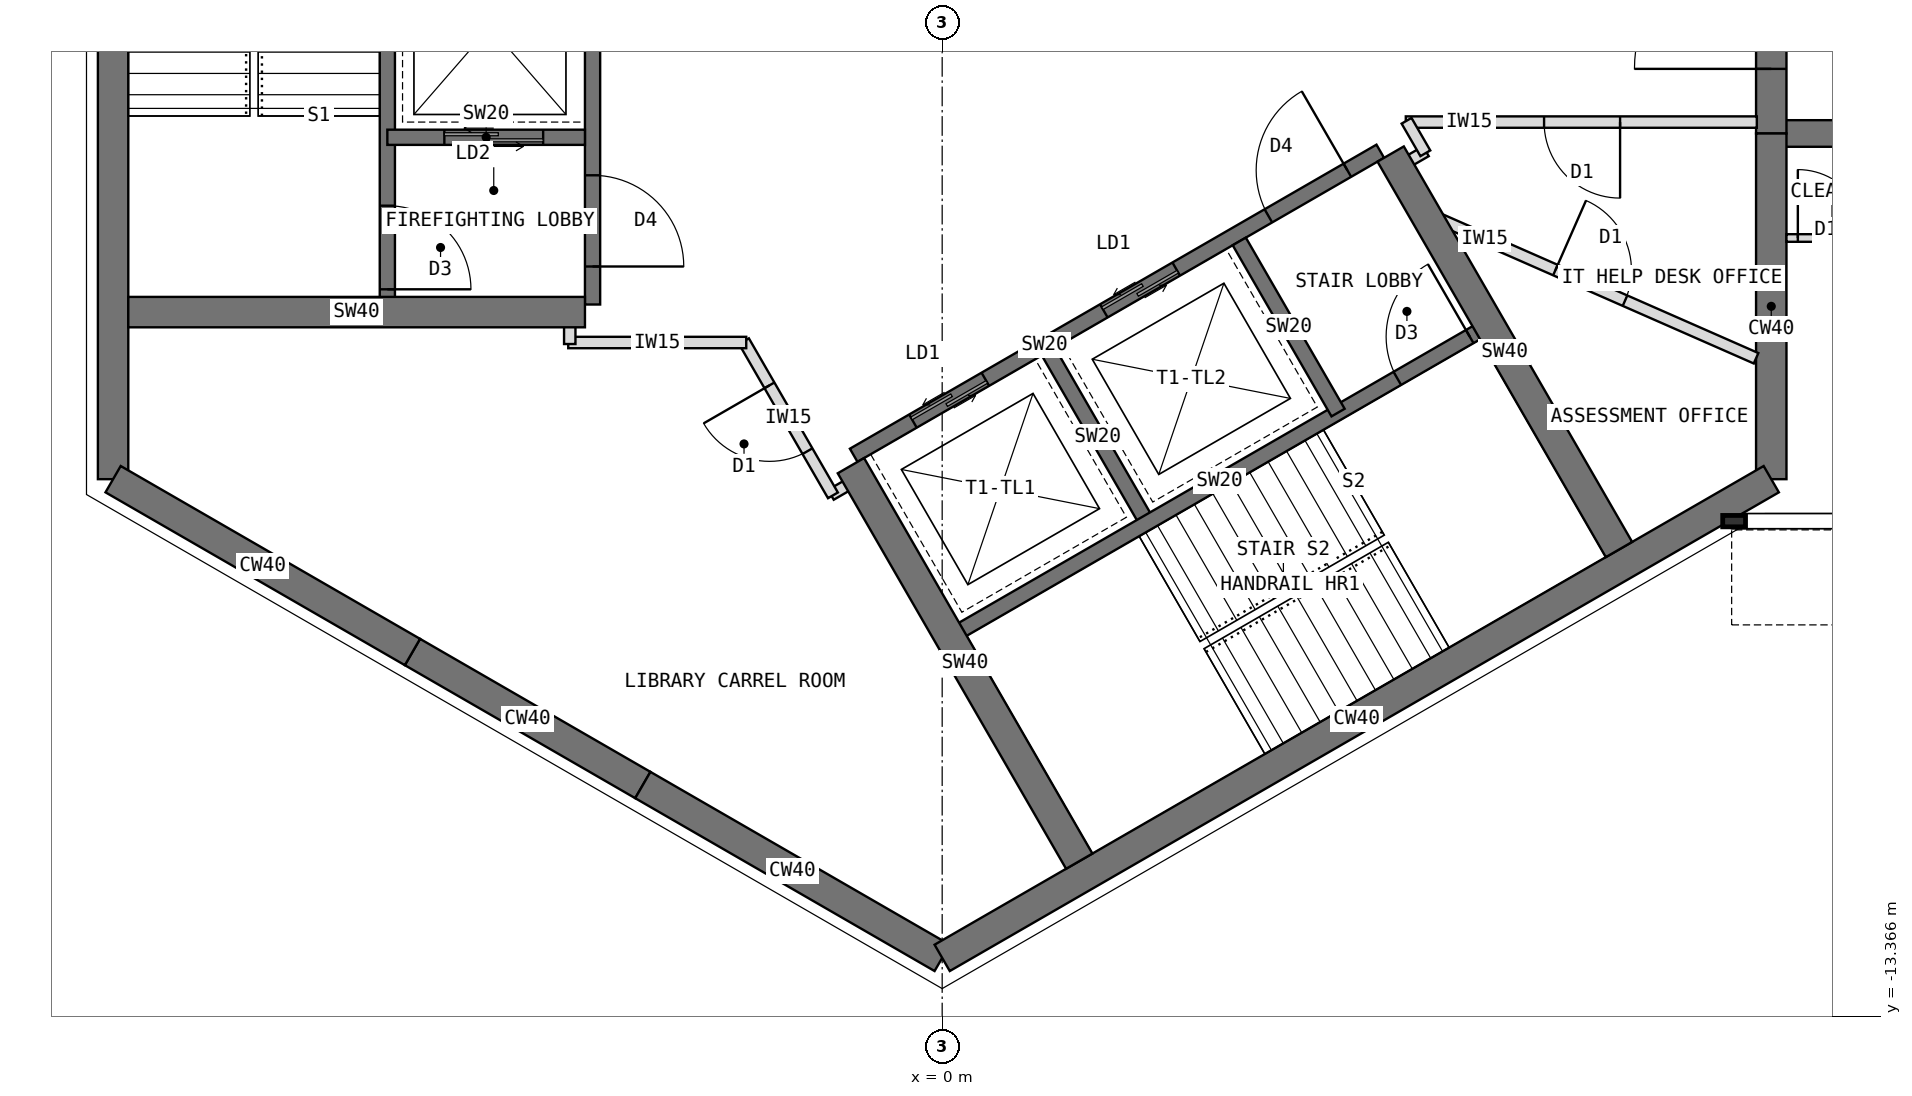
"""IFC4 building model, lengths in metres.
Left out: names, types, materials, properties, quantities, classifications, styles, units other than length and angle.
Written with IfcOpenShell. Run it as: python <this file> out.ifc"""

import sys

from ifc_helpers import new_model, si_unit, direction, frame, frame_2d, origin, place, context, subcontext, project, spatial, rectangle, extrude, element, fill, save


model = new_model("IFC4")
c1 = context("Model", 3, precision=1e-05, world=origin(), true_north=direction((0.0, 1.0)))
c2 = subcontext(c1, "Body", "Model", "MODEL_VIEW")
j1 = project(units=[si_unit("LENGTHUNIT", "METRE"), si_unit("PLANEANGLEUNIT", "RADIAN")], contexts=[c1])
p1 = place(None, origin())
s1 = spatial("IfcSite", under=j1, at=p1, CompositionType="ELEMENT")
p2 = place(p1, origin())
s2 = spatial("IfcBuilding", under=s1, at=p2, CompositionType="ELEMENT")
p3 = place(p2, frame((0.0, 0.0, 267.5)))
s3 = spatial("IfcBuildingStorey", under=s2, at=p3, CompositionType="ELEMENT", Elevation=267.5)
p4 = place(p3, frame((10.908, -6.298, 0.0), z_axis=(0.0, 0.0, 1.0), x_axis=(0.0, 1.0, 0.0)))
e1 = element("IfcWall", 1, at=p4, inside=s3, PredefinedType="SHEAR", context=c2, shape_type="SweptSolid", body=[
    extrude(rectangle(XDim=4.548, YDim=0.4, at=frame_2d((2.274, 0.0))), origin(), (0.0, 0.0, 1.0), 4.0),
])
p5 = place(p3, frame((10.908, -1.75, 0.0), z_axis=(0.0, 0.0, 1.0), x_axis=(0.0, 1.0, 0.0)))
e2 = element("IfcWall", 2, at=p5, inside=s3, PredefinedType="SHEAR", context=c2, shape_type="SweptSolid", body=[
    extrude(rectangle(XDim=3.5, YDim=0.4, at=frame_2d((1.75, 0.0))), origin(), (0.0, 0.0, 1.0), 4.0),
])
p6 = place(p5, frame((0.85, 0.0, 0.0)))
e3 = element("IfcOpeningElement", 3, at=p6, cuts=e2, PredefinedType="OPENING", context=c2, shape_type="SweptSolid", body=[
    extrude(rectangle(XDim=1.8, YDim=2.1, at=frame_2d((0.9, 1.05))), frame((0.0, 0.21, 0.0), z_axis=(0.0, -1.0, 0.0), x_axis=(1.0, 0.0, 0.0)), (0.0, 0.0, 1.0), 0.42),
])
p7 = place(p3, frame((-10.908, 6.298, 0.0), z_axis=(0.0, 0.0, 1.0), x_axis=(0.0, -1.0, 0.0)))
e4 = element("IfcWall", 4, at=p7, inside=s3, PredefinedType="SHEAR", context=c2, shape_type="SweptSolid", body=[
    extrude(rectangle(XDim=12.596, YDim=0.4, at=frame_2d((6.298, 0.0))), origin(), (0.0, 0.0, 1.0), 4.0),
])
p8 = place(p3, frame((-10.908, -6.298, 0.0), z_axis=(0.0, 0.0, 1.0), x_axis=(0.866034513004, -0.499984222037, 0.0)))
e5 = element("IfcWall", 5, at=p8, inside=s3, PredefinedType="SHEAR", context=c2, shape_type="SweptSolid", body=[
    extrude(rectangle(XDim=4.548, YDim=0.4, at=frame_2d((2.274, 0.0))), origin(), (0.0, 0.0, 1.0), 4.0),
])
p9 = place(p3, frame((-6.97, -8.572, 0.0), z_axis=(0.0, 0.0, 1.0), x_axis=(0.866019471182, -0.500010275428, 0.0)))
e6 = element("IfcWall", 6, at=p9, inside=s3, PredefinedType="SHEAR", context=c2, shape_type="SweptSolid", body=[
    extrude(rectangle(XDim=3.5, YDim=0.4, at=frame_2d((1.75, 0.0))), origin(), (0.0, 0.0, 1.0), 4.0),
])
p10 = place(p3, frame((-3.939, -10.322, 0.0), z_axis=(0.0, 0.0, 1.0), x_axis=(0.866011268655, -0.500024481964, 0.0)))
e7 = element("IfcWall", 7, at=p10, inside=s3, PredefinedType="SHEAR", context=c2, shape_type="SweptSolid", body=[
    extrude(rectangle(XDim=4.548, YDim=0.4, at=frame_2d((2.274, 0.0))), origin(), (0.0, 0.0, 1.0), 4.0),
])
p11 = place(p3, frame((0.0, -12.596, 0.0), z_axis=(0.0, 0.0, 1.0), x_axis=(0.866021940709, 0.500005998175, 0.0)))
e8 = element("IfcWall", 8, at=p11, inside=s3, PredefinedType="SHEAR", context=c2, shape_type="SweptSolid", body=[
    extrude(rectangle(XDim=12.596, YDim=0.4, at=frame_2d((6.298, 0.0))), origin(), (0.0, 0.0, 1.0), 4.0),
])
p12 = place(p3, frame((10.908, -1.75, 0.0), z_axis=(0.0, 0.0, 1.0), x_axis=(1.0, 0.0, 0.0)))
e9 = element("IfcWall", 9, at=p12, inside=s3, PredefinedType="SHEAR", context=c2, shape_type="SweptSolid", body=[
    extrude(rectangle(XDim=2.592, YDim=0.35, at=frame_2d((1.296, 0.0))), origin(), (0.0, 0.0, 1.0), 4.0),
])
p13 = place(p3, frame((-4.6, 4.0, 0.0), z_axis=(0.0, 0.0, 1.0), x_axis=(0.0, -1.0, 0.0)))
e10 = element("IfcWall", 10, at=p13, inside=s3, PredefinedType="SHEAR", context=c2, shape_type="SweptSolid", body=[
    extrude(rectangle(XDim=8.0, YDim=0.2, at=frame_2d((4.0, 0.0))), origin(), (0.0, 0.0, 1.0), 4.0),
])
p14 = place(p13, frame((6.3, 0.0, 0.0)))
e11 = element("IfcOpeningElement", 11, at=p14, cuts=e10, PredefinedType="OPENING", context=c2, shape_type="SweptSolid", body=[
    extrude(rectangle(XDim=1.2, YDim=2.1, at=frame_2d((0.6, 1.05))), frame((0.0, 0.11, 0.0), z_axis=(0.0, -1.0, 0.0), x_axis=(1.0, 0.0, 0.0)), (0.0, 0.0, 1.0), 0.22),
])
p15 = place(p13, frame((0.9, 0.0, 0.0)))
e12 = element("IfcOpeningElement", 12, at=p15, cuts=e10, PredefinedType="OPENING", context=c2, shape_type="SweptSolid", body=[
    extrude(rectangle(XDim=1.1, YDim=2.2, at=frame_2d((0.55, 1.1))), frame((0.0, 0.11, 0.0), z_axis=(0.0, -1.0, 0.0), x_axis=(1.0, 0.0, 0.0)), (0.0, 0.0, 1.0), 0.22),
])
p16 = place(p3, frame((-4.7, -1.8, 0.0), z_axis=(0.0, 0.0, 1.0), x_axis=(-1.0, 0.0, 0.0)))
e13 = element("IfcWall", 13, at=p16, inside=s3, PredefinedType="SHEAR", context=c2, shape_type="SweptSolid", body=[
    extrude(rectangle(XDim=2.6, YDim=0.2, at=frame_2d((1.3, 0.0))), origin(), (0.0, 0.0, 1.0), 4.0),
])
p17 = place(p16, frame((0.55, 0.0, 0.0)))
e14 = element("IfcOpeningElement", 14, at=p17, cuts=e13, PredefinedType="OPENING", context=c2, shape_type="SweptSolid", body=[
    extrude(rectangle(XDim=1.3, YDim=2.2, at=frame_2d((0.65, 1.1))), frame((0.0, 0.11, 0.0), z_axis=(0.0, -1.0, 0.0), x_axis=(1.0, 0.0, 0.0)), (0.0, 0.0, 1.0), 0.22),
])
p18 = place(p3, frame((-7.3, 4.0, 0.0), z_axis=(0.0, 0.0, 1.0), x_axis=(0.0, -1.0, 0.0)))
e15 = element("IfcWall", 15, at=p18, inside=s3, PredefinedType="SHEAR", context=c2, shape_type="SweptSolid", body=[
    extrude(rectangle(XDim=8.0, YDim=0.2, at=frame_2d((4.0, 0.0))), origin(), (0.0, 0.0, 1.0), 4.0),
])
p19 = place(p18, frame((6.7, 0.0, 0.0)))
e16 = element("IfcOpeningElement", 16, at=p19, cuts=e15, PredefinedType="OPENING", context=c2, shape_type="SweptSolid", body=[
    extrude(rectangle(XDim=1.1, YDim=2.1, at=frame_2d((0.55, 1.05))), frame((0.0, 0.11, 0.0), z_axis=(0.0, -1.0, 0.0), x_axis=(1.0, 0.0, 0.0)), (0.0, 0.0, 1.0), 0.22),
])
p20 = place(p3, frame((-4.7, -4.1, 0.0), z_axis=(0.0, 0.0, 1.0), x_axis=(-1.0, 0.0, 0.0)))
e17 = element("IfcWall", 17, at=p20, inside=s3, PredefinedType="SHEAR", context=c2, shape_type="SweptSolid", body=[
    extrude(rectangle(XDim=6.008, YDim=0.4, at=frame_2d((3.004, 0.0))), origin(), (0.0, 0.0, 1.0), 4.0),
])
p21 = place(p3, frame((-1.164, -5.984, 0.0), z_axis=(0.0, 0.0, 1.0), x_axis=(0.866026010844, 0.49999894854, 0.0)))
e18 = element("IfcWall", 18, at=p21, inside=s3, PredefinedType="SHEAR", context=c2, shape_type="SweptSolid", body=[
    extrude(rectangle(XDim=8.0, YDim=0.2, at=frame_2d((4.0, 0.0))), origin(), (0.0, 0.0, 1.0), 4.0),
])
p22 = place(p21, frame((6.3, 0.0, 0.0)))
e19 = element("IfcOpeningElement", 19, at=p22, cuts=e18, PredefinedType="OPENING", context=c2, shape_type="SweptSolid", body=[
    extrude(rectangle(XDim=1.2, YDim=2.1, at=frame_2d((0.6, 1.05))), frame((0.0, 0.11, 0.0), z_axis=(0.0, -1.0, 0.0), x_axis=(1.0, 0.0, 0.0)), (0.0, 0.0, 1.0), 0.22),
])
p23 = place(p21, frame((0.9, 0.0, 0.0)))
e20 = element("IfcOpeningElement", 20, at=p23, cuts=e18, PredefinedType="OPENING", context=c2, shape_type="SweptSolid", body=[
    extrude(rectangle(XDim=1.1, YDim=2.2, at=frame_2d((0.55, 1.1))), frame((0.0, 0.11, 0.0), z_axis=(0.0, -1.0, 0.0), x_axis=(1.0, 0.0, 0.0)), (0.0, 0.0, 1.0), 0.22),
])
p24 = place(p21, frame((3.8, 0.0, 0.0)))
e21 = element("IfcOpeningElement", 21, at=p24, cuts=e18, PredefinedType="OPENING", context=c2, shape_type="SweptSolid", body=[
    extrude(rectangle(XDim=1.1, YDim=2.2, at=frame_2d((0.55, 1.1))), frame((0.0, 0.11, 0.0), z_axis=(0.0, -1.0, 0.0), x_axis=(1.0, 0.0, 0.0)), (0.0, 0.0, 1.0), 0.22),
])
p25 = place(p3, frame((1.397, -4.62, 0.0), z_axis=(0.0, 0.0, 1.0), x_axis=(0.499936506574, -0.866062058628, 0.0)))
e22 = element("IfcWall", 22, at=p25, inside=s3, PredefinedType="SHEAR", context=c2, shape_type="SweptSolid", body=[
    extrude(rectangle(XDim=2.6, YDim=0.2, at=frame_2d((1.3, 0.0))), origin(), (0.0, 0.0, 1.0), 4.0),
])
p26 = place(p3, frame((3.909, -3.17, 0.0), z_axis=(0.0, 0.0, 1.0), x_axis=(0.49997716683, -0.86603858612, 0.0)))
e23 = element("IfcWall", 23, at=p26, inside=s3, PredefinedType="SHEAR", context=c2, shape_type="SweptSolid", body=[
    extrude(rectangle(XDim=2.6, YDim=0.2, at=frame_2d((1.3, 0.0))), origin(), (0.0, 0.0, 1.0), 4.0),
])
p27 = place(p3, frame((0.186, -8.322, 0.0), z_axis=(0.0, 0.0, 1.0), x_axis=(0.866026010844, 0.49999894854, 0.0)))
e24 = element("IfcWall", 24, at=p27, inside=s3, PredefinedType="SHEAR", context=c2, shape_type="SweptSolid", body=[
    extrude(rectangle(XDim=8.0, YDim=0.2, at=frame_2d((4.0, 0.0))), origin(), (0.0, 0.0, 1.0), 4.0),
])
p28 = place(p27, frame((6.7, 0.0, 0.0)))
e25 = element("IfcOpeningElement", 25, at=p28, cuts=e24, PredefinedType="OPENING", context=c2, shape_type="SweptSolid", body=[
    extrude(rectangle(XDim=1.1, YDim=2.1, at=frame_2d((0.55, 1.05))), frame((0.0, 0.11, 0.0), z_axis=(0.0, -1.0, 0.0), x_axis=(1.0, 0.0, 0.0)), (0.0, 0.0, 1.0), 0.22),
])
for number, where, z_axis, x_axis in (
    (26, (5.901, -2.02, 0.0), (0.0, 0.0, 1.0), (0.5, -0.866, 0.0)),
    (27, (-1.201, -6.12, 0.0), (0.0, 0.0, 1.0), (0.5, -0.866, 0.0)),
):
    element("IfcWall", number, at=place(p3, frame(where, z_axis=z_axis, x_axis=x_axis)), inside=s3, PredefinedType="SHEAR", context=c2, shape_type="SweptSolid", body=[
        extrude(rectangle(XDim=6.008, YDim=0.4, at=frame_2d((3.004, 0.0))), origin(), (0.0, 0.0, 1.0), 4.0),
    ])
p29 = place(p3, frame((11.108, -3.125, 0.0), z_axis=(0.0, 0.0, 1.0), x_axis=(1.0, 0.0, 0.0)))
e28 = element("IfcWall", 28, at=p29, inside=s3, PredefinedType="PARTITIONING", context=c2, shape_type="SweptSolid", body=[
    extrude(rectangle(XDim=2.4, YDim=0.1, at=frame_2d((1.2, 0.0))), origin(), (0.0, 0.0, 1.0), 3.8),
])
p30 = place(p29, frame((0.15, 0.0, 0.0)))
e29 = element("IfcOpeningElement", 29, at=p30, cuts=e28, PredefinedType="OPENING", context=c2, shape_type="SweptSolid", body=[
    extrude(rectangle(XDim=0.9, YDim=2.1, at=frame_2d((0.45, 1.05))), frame((0.0, 0.06, 0.0), z_axis=(0.0, -1.0, 0.0), x_axis=(1.0, 0.0, 0.0)), (0.0, 0.0, 1.0), 0.12),
])
for number, where, z_axis, x_axis in (
    (30, (6.365, -1.983, 0.0), (0.0, 0.0, 1.0), (-0.866, -0.5, 0.0)),
    (31, (-1.092, -6.289, 0.0), (0.0, 0.0, 1.0), (-0.866, -0.5, 0.0)),
):
    element("IfcWall", number, at=place(p3, frame(where, z_axis=z_axis, x_axis=x_axis)), inside=s3, PredefinedType="PARTITIONING", context=c2, shape_type="SweptSolid", body=[
        extrude(rectangle(XDim=0.43, YDim=0.15, at=frame_2d((0.215, 0.0))), origin(), (0.0, 0.0, 1.0), 3.8),
    ])
p31 = place(p3, frame((-1.437, -6.511, 0.0), z_axis=(0.0, 0.0, 1.0), x_axis=(-0.500074377092, 0.865982457891, 0.0)))
e32 = element("IfcWall", 32, at=p31, inside=s3, PredefinedType="PARTITIONING", context=c2, shape_type="SweptSolid", body=[
    extrude(rectangle(XDim=2.342, YDim=0.15, at=frame_2d((1.171, 0.0))), origin(), (0.0, 0.0, 1.0), 3.8),
])
p32 = place(p31, frame((0.671, 0.0, 0.0)))
e33 = element("IfcOpeningElement", 33, at=p32, cuts=e32, PredefinedType="OPENING", context=c2, shape_type="SweptSolid", body=[
    extrude(rectangle(XDim=1.0, YDim=2.1, at=frame_2d((0.5, 1.05))), frame((0.0, 0.085, 0.0), z_axis=(0.0, -1.0, 0.0), x_axis=(1.0, 0.0, 0.0)), (0.0, 0.0, 1.0), 0.17),
])
p33 = place(p3, frame((-2.578, -4.5, 0.0), z_axis=(0.0, 0.0, 1.0), x_axis=(-1.0, 0.0, 0.0)))
e34 = element("IfcWall", 34, at=p33, inside=s3, PredefinedType="PARTITIONING", context=c2, shape_type="SweptSolid", body=[
    extrude(rectangle(XDim=2.342, YDim=0.15, at=frame_2d((1.171, 0.0))), origin(), (0.0, 0.0, 1.0), 3.8),
])
p34 = place(p3, frame((-4.9, -4.52, 0.0), z_axis=(0.0, 0.0, 1.0), x_axis=(0.0, 1.0, 0.0)))
e35 = element("IfcWall", 35, at=p34, inside=s3, PredefinedType="PARTITIONING", context=c2, shape_type="SweptSolid", body=[
    extrude(rectangle(XDim=0.43, YDim=0.15, at=frame_2d((0.215, 0.0))), origin(), (0.0, 0.0, 1.0), 3.8),
])
p35 = place(p3, frame((10.718, -1.6, 0.0), z_axis=(0.0, 0.0, 1.0), x_axis=(-1.0, 0.0, 0.0)))
e36 = element("IfcWall", 36, at=p35, inside=s3, PredefinedType="PARTITIONING", context=c2, shape_type="SweptSolid", body=[
    extrude(rectangle(XDim=4.618, YDim=0.15, at=frame_2d((2.309, 0.0))), origin(), (0.0, 0.0, 1.0), 3.8),
])
p36 = place(p35, frame((1.799, 0.0, 0.0)))
e37 = element("IfcOpeningElement", 37, at=p36, cuts=e36, PredefinedType="OPENING", context=c2, shape_type="SweptSolid", body=[
    extrude(rectangle(XDim=1.0, YDim=2.1, at=frame_2d((0.5, 1.05))), frame((0.0, 0.085, 0.0), z_axis=(0.0, -1.0, 0.0), x_axis=(1.0, 0.0, 0.0)), (0.0, 0.0, 1.0), 0.17),
])
p37 = place(p3, frame((6.11, -1.583, 0.0), z_axis=(0.0, 0.0, 1.0), x_axis=(0.50033519877, -0.865831790172, 0.0)))
e38 = element("IfcWall", 38, at=p37, inside=s3, PredefinedType="PARTITIONING", context=c2, shape_type="SweptSolid", body=[
    extrude(rectangle(XDim=0.494, YDim=0.15, at=frame_2d((0.247, 0.0))), origin(), (0.0, 0.0, 1.0), 3.8),
])
p38 = place(p3, frame((6.344, -2.789, 0.0), z_axis=(0.0, 0.0, 1.0), x_axis=(0.915438841787, -0.402457111937, 0.0)))
e39 = element("IfcWall", 39, at=p38, inside=s3, PredefinedType="PARTITIONING", context=c2, shape_type="SweptSolid", body=[
    extrude(rectangle(XDim=4.767, YDim=0.15, at=frame_2d((2.383, 0.0))), origin(), (0.0, 0.0, 1.0), 3.8),
])
p39 = place(p38, frame((1.883, 0.0, 0.0)))
e40 = element("IfcOpeningElement", 40, at=p39, cuts=e39, PredefinedType="OPENING", context=c2, shape_type="SweptSolid", body=[
    extrude(rectangle(XDim=1.0, YDim=2.1, at=frame_2d((0.5, 1.05))), frame((0.0, 0.085, 0.0), z_axis=(0.0, -1.0, 0.0), x_axis=(1.0, 0.0, 0.0)), (0.0, 0.0, 1.0), 0.17),
])
p40 = place(p14, origin())
e41 = element("IfcDoor", 41, at=p40, inside=s3, OperationType="SINGLE_SWING_RIGHT", PredefinedType="DOOR", context=c2, shape_type="SweptSolid", body=[
    extrude(rectangle(XDim=1.2, YDim=2.1, at=frame_2d((0.6, 1.05))), frame((0.0, 0.025, 0.0), z_axis=(0.0, -1.0, 0.0), x_axis=(1.0, 0.0, 0.0)), (0.0, 0.0, 1.0), 0.05),
])
fill(e11, e41)
p41 = place(p17, origin())
e42 = element("IfcDoor", 42, at=p41, inside=s3, OperationType="DOUBLE_DOOR_SLIDING", PredefinedType="DOOR", context=c2, shape_type="SweptSolid", body=[
    extrude(rectangle(XDim=1.3, YDim=2.2, at=frame_2d((0.65, 1.1))), frame((0.0, 0.025, 0.0), z_axis=(0.0, -1.0, 0.0), x_axis=(1.0, 0.0, 0.0)), (0.0, 0.0, 1.0), 0.05),
])
fill(e14, e42)
p42 = place(p19, origin())
e43 = element("IfcDoor", 43, at=p42, inside=s3, OperationType="SINGLE_SWING_RIGHT", PredefinedType="DOOR", context=c2, shape_type="SweptSolid", body=[
    extrude(rectangle(XDim=1.1, YDim=2.1, at=frame_2d((0.55, 1.05))), frame((0.0, 0.025, 0.0), z_axis=(0.0, -1.0, 0.0), x_axis=(1.0, 0.0, 0.0)), (0.0, 0.0, 1.0), 0.05),
])
fill(e16, e43)
p43 = place(p22, origin())
e44 = element("IfcDoor", 44, at=p43, inside=s3, OperationType="SINGLE_SWING_RIGHT", PredefinedType="DOOR", context=c2, shape_type="SweptSolid", body=[
    extrude(rectangle(XDim=1.2, YDim=2.1, at=frame_2d((0.6, 1.05))), frame((0.0, 0.025, 0.0), z_axis=(0.0, -1.0, 0.0), x_axis=(1.0, 0.0, 0.0)), (0.0, 0.0, 1.0), 0.05),
])
fill(e19, e44)
p44 = place(p23, origin())
e45 = element("IfcDoor", 45, at=p44, inside=s3, OperationType="DOUBLE_DOOR_SLIDING", PredefinedType="DOOR", context=c2, shape_type="SweptSolid", body=[
    extrude(rectangle(XDim=1.1, YDim=2.2, at=frame_2d((0.55, 1.1))), frame((0.0, 0.025, 0.0), z_axis=(0.0, -1.0, 0.0), x_axis=(1.0, 0.0, 0.0)), (0.0, 0.0, 1.0), 0.05),
])
fill(e20, e45)
p45 = place(p24, origin())
e46 = element("IfcDoor", 46, at=p45, inside=s3, OperationType="DOUBLE_DOOR_SLIDING", PredefinedType="DOOR", context=c2, shape_type="SweptSolid", body=[
    extrude(rectangle(XDim=1.1, YDim=2.2, at=frame_2d((0.55, 1.1))), frame((0.0, 0.025, 0.0), z_axis=(0.0, -1.0, 0.0), x_axis=(1.0, 0.0, 0.0)), (0.0, 0.0, 1.0), 0.05),
])
fill(e21, e46)
p46 = place(p28, origin())
e47 = element("IfcDoor", 47, at=p46, inside=s3, OperationType="SINGLE_SWING_RIGHT", PredefinedType="DOOR", context=c2, shape_type="SweptSolid", body=[
    extrude(rectangle(XDim=1.1, YDim=2.1, at=frame_2d((0.55, 1.05))), frame((0.0, 0.025, 0.0), z_axis=(0.0, -1.0, 0.0), x_axis=(1.0, 0.0, 0.0)), (0.0, 0.0, 1.0), 0.05),
])
fill(e25, e47)
p47 = place(p6, origin())
e48 = element("IfcDoor", 48, at=p47, inside=s3, OperationType="DOUBLE_DOOR_DOUBLE_SWING", PredefinedType="DOOR", context=c2, shape_type="SweptSolid", body=[
    extrude(rectangle(XDim=1.8, YDim=2.1, at=frame_2d((0.9, 1.05))), frame((0.0, 0.025, 0.0), z_axis=(0.0, -1.0, 0.0), x_axis=(1.0, 0.0, 0.0)), (0.0, 0.0, 1.0), 0.05),
])
fill(e3, e48)
p48 = place(p30, origin())
e49 = element("IfcDoor", 49, at=p48, inside=s3, OperationType="SINGLE_SWING_LEFT", PredefinedType="DOOR", context=c2, shape_type="SweptSolid", body=[
    extrude(rectangle(XDim=0.9, YDim=2.1, at=frame_2d((0.45, 1.05))), frame((0.0, 0.025, 0.0), z_axis=(0.0, -1.0, 0.0), x_axis=(1.0, 0.0, 0.0)), (0.0, 0.0, 1.0), 0.05),
])
fill(e29, e49)
p49 = place(p32, origin())
e50 = element("IfcDoor", 50, at=p49, inside=s3, OperationType="SINGLE_SWING_RIGHT", PredefinedType="DOOR", context=c2, shape_type="SweptSolid", body=[
    extrude(rectangle(XDim=1.0, YDim=2.1, at=frame_2d((0.5, 1.05))), frame((0.0, 0.025, 0.0), z_axis=(0.0, -1.0, 0.0), x_axis=(1.0, 0.0, 0.0)), (0.0, 0.0, 1.0), 0.05),
])
fill(e33, e50)
p50 = place(p36, origin())
e51 = element("IfcDoor", 51, at=p50, inside=s3, OperationType="SINGLE_SWING_LEFT", PredefinedType="DOOR", context=c2, shape_type="SweptSolid", body=[
    extrude(rectangle(XDim=1.0, YDim=2.1, at=frame_2d((0.5, 1.05))), frame((0.0, 0.025, 0.0), z_axis=(0.0, -1.0, 0.0), x_axis=(1.0, 0.0, 0.0)), (0.0, 0.0, 1.0), 0.05),
])
fill(e37, e51)
p51 = place(p39, origin())
e52 = element("IfcDoor", 52, at=p51, inside=s3, OperationType="SINGLE_SWING_LEFT", PredefinedType="DOOR", context=c2, shape_type="SweptSolid", body=[
    extrude(rectangle(XDim=1.0, YDim=2.1, at=frame_2d((0.5, 1.05))), frame((0.0, 0.025, 0.0), z_axis=(0.0, -1.0, 0.0), x_axis=(1.0, 0.0, 0.0)), (0.0, 0.0, 1.0), 0.05),
])
fill(e40, e52)
save(model, sys.argv[1])
